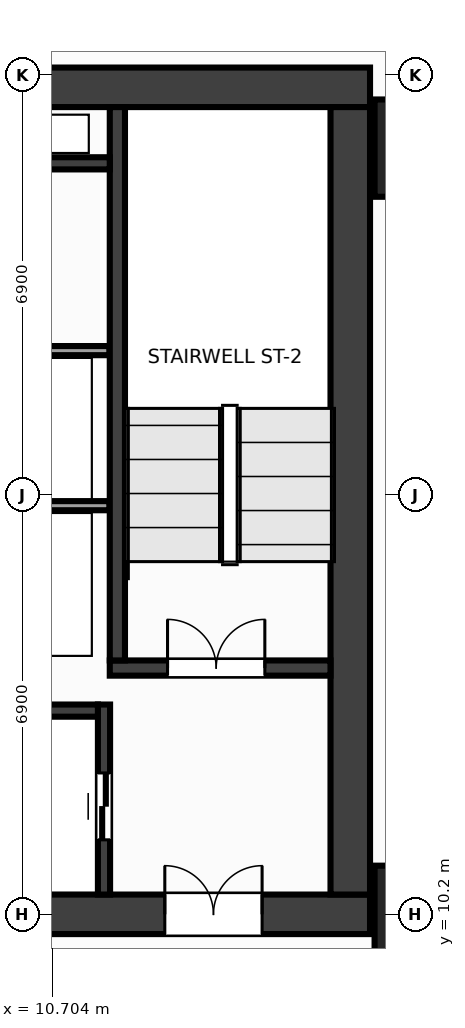
"""IFC4 building model, lengths in metres.
Left out: names, types, materials, properties, quantities, classifications, styles, units other than length and angle.
Written with IfcOpenShell. Run it as: python <this file> out.ifc"""

import sys

from ifc_helpers import new_model, si_unit, direction, frame, frame_2d, origin, origin_2d, place, context, subcontext, project, spatial, rectangle, extrude, source, transform, mapped, element, fill, save


model = new_model("IFC4")
c1 = context("Model", 3, precision=1e-05, world=origin(), true_north=direction((0.0, 1.0)))
c2 = subcontext(c1, "Body", "Model", "MODEL_VIEW")
j1 = project(units=[si_unit("LENGTHUNIT", "METRE"), si_unit("PLANEANGLEUNIT", "RADIAN")], contexts=[c1])
p1 = place(None, origin())
s1 = spatial("IfcSite", under=j1, at=p1, CompositionType="ELEMENT")
p2 = place(p1, origin())
s2 = spatial("IfcBuilding", under=s1, at=p2, CompositionType="ELEMENT")
p3 = place(p2, frame((0.0, 0.0, 120.8)))
s3 = spatial("IfcBuildingStorey", under=s2, at=p3, CompositionType="ELEMENT", Elevation=120.8)
m1 = source(origin(), c2, "Body", "SweptSolid", [
    extrude(rectangle(XDim=31.85, YDim=0.65, at=frame_2d((15.925, 0.0))), origin(), (0.0, 0.0, 1.0), 3.6),
])
p4 = place(p3, frame((-15.925, 23.8, 0.0), z_axis=(0.0, 0.0, 1.0), x_axis=(1.0, 0.0, 0.0)))
e1 = element("IfcWall", 1, at=p4, inside=s3, PredefinedType="SHEAR", context=c2, shape_type="MappedRepresentation", body=[
    mapped(m1, transform((0.0, 0.0, 0.0), x_axis=(1.0, 0.0, 0.0), y_axis=(0.0, 1.0, 0.0), z_axis=(0.0, 0.0, 1.0), scale=1.0)),
])
p5 = place(p3, frame((-15.925, 10.2, 0.0), z_axis=(0.0, 0.0, 1.0), x_axis=(1.0, 0.0, 0.0)))
e2 = element("IfcWall", 2, at=p5, inside=s3, PredefinedType="SHEAR", context=c2, shape_type="MappedRepresentation", body=[
    mapped(m1, transform((0.0, 0.0, 0.0), x_axis=(1.0, 0.0, 0.0), y_axis=(0.0, 1.0, 0.0), z_axis=(0.0, 0.0, 1.0), scale=1.0)),
])
p6 = place(p5, frame((1.775, 0.0, 0.0)))
e3 = element("IfcOpeningElement", 3, at=p6, cuts=e2, PredefinedType="OPENING", context=c2, shape_type="SweptSolid", body=[
    extrude(rectangle(XDim=1.6, YDim=2.15, at=frame_2d((0.8, 1.075))), frame((0.0, 0.337, 0.0), z_axis=(0.0, -1.0, 0.0), x_axis=(1.0, 0.0, 0.0)), (0.0, 0.0, 1.0), 0.674),
])
p7 = place(p5, frame((28.475, 0.0, 0.0)))
e4 = element("IfcOpeningElement", 4, at=p7, cuts=e2, PredefinedType="OPENING", context=c2, shape_type="SweptSolid", body=[
    extrude(rectangle(XDim=1.6, YDim=2.15, at=frame_2d((0.8, 1.075))), frame((0.0, 0.337, 0.0), z_axis=(0.0, -1.0, 0.0), x_axis=(1.0, 0.0, 0.0)), (0.0, 0.0, 1.0), 0.674),
])
p8 = place(p5, frame((15.175, 0.0, 0.0)))
e5 = element("IfcOpeningElement", 5, at=p8, cuts=e2, PredefinedType="OPENING", context=c2, shape_type="SweptSolid", body=[
    extrude(rectangle(XDim=1.5, YDim=2.2, at=frame_2d((0.75, 1.1))), frame((0.0, 0.337, 0.0), z_axis=(0.0, -1.0, 0.0), x_axis=(1.0, 0.0, 0.0)), (0.0, 0.0, 1.0), 0.674),
])
m2 = source(origin(), c2, "Body", "SweptSolid", [
    extrude(rectangle(XDim=12.95, YDim=0.65, at=frame_2d((6.475, 0.0))), origin(), (0.0, 0.0, 1.0), 3.6),
])
p9 = place(p3, frame((15.6, 10.525, 0.0), z_axis=(0.0, 0.0, 1.0), x_axis=(0.0, 1.0, 0.0)))
e6 = element("IfcWall", 6, at=p9, inside=s3, PredefinedType="SHEAR", context=c2, shape_type="MappedRepresentation", body=[
    mapped(m2, transform((0.0, 0.0, 0.0), x_axis=(1.0, 0.0, 0.0), y_axis=(0.0, 1.0, 0.0), z_axis=(0.0, 0.0, 1.0), scale=1.0)),
])
m3 = source(origin(), c2, "Body", "SweptSolid", [
    extrude(rectangle(XDim=3.63, YDim=0.25, at=frame_2d((1.815, 0.0))), origin(), (0.0, 0.0, 1.0), 3.6),
])
p10 = place(p3, frame((11.645, 14.25, 0.0), z_axis=(0.0, 0.0, 1.0), x_axis=(1.0, 0.0, 0.0)))
e7 = element("IfcWall", 7, at=p10, inside=s3, PredefinedType="SHEAR", context=c2, shape_type="MappedRepresentation", body=[
    mapped(m3, transform((0.0, 0.0, 0.0), x_axis=(1.0, 0.0, 0.0), y_axis=(0.0, 1.0, 0.0), z_axis=(0.0, 0.0, 1.0), scale=1.0)),
])
p11 = place(p10, frame((0.95, 0.0, 0.0)))
e8 = element("IfcOpeningElement", 8, at=p11, cuts=e7, PredefinedType="OPENING", context=c2, shape_type="SweptSolid", body=[
    extrude(rectangle(XDim=1.6, YDim=2.15, at=frame_2d((0.8, 1.075))), frame((0.0, 0.137, 0.0), z_axis=(0.0, -1.0, 0.0), x_axis=(1.0, 0.0, 0.0)), (0.0, 0.0, 1.0), 0.274),
])
m4 = source(origin(), c2, "Body", "SweptSolid", [
    extrude(rectangle(XDim=9.1, YDim=0.25, at=frame_2d((4.55, 0.0))), origin(), (0.0, 0.0, 1.0), 3.6),
])
p12 = place(p3, frame((11.77, 14.375, 0.0), z_axis=(0.0, 0.0, 1.0), x_axis=(0.0, 1.0, 0.0)))
e9 = element("IfcWall", 9, at=p12, inside=s3, PredefinedType="SHEAR", context=c2, shape_type="MappedRepresentation", body=[
    mapped(m4, transform((0.0, 0.0, 0.0), x_axis=(1.0, 0.0, 0.0), y_axis=(0.0, 1.0, 0.0), z_axis=(0.0, 0.0, 1.0), scale=1.0)),
])
m5 = source(origin(), c2, "Body", "SweptSolid", [
    extrude(rectangle(XDim=3.125, YDim=0.2, at=frame_2d((1.562, 0.0))), origin(), (0.0, 0.0, 1.0), 3.6),
])
p13 = place(p3, frame((11.55, 10.525, 0.0), z_axis=(0.0, 0.0, 1.0), x_axis=(0.0, 1.0, 0.0)))
e10 = element("IfcWall", 10, at=p13, inside=s3, PredefinedType="SHEAR", context=c2, shape_type="MappedRepresentation", body=[
    mapped(m5, transform((0.0, 0.0, 0.0), x_axis=(1.0, 0.0, 0.0), y_axis=(0.0, 1.0, 0.0), z_axis=(0.0, 0.0, 1.0), scale=1.0)),
])
p14 = place(p13, frame((0.9, 0.0, 0.0)))
e11 = element("IfcOpeningElement", 11, at=p14, cuts=e10, PredefinedType="OPENING", context=c2, shape_type="SweptSolid", body=[
    extrude(rectangle(XDim=1.1, YDim=2.15, at=frame_2d((0.55, 1.075))), frame((0.0, 0.112, 0.0), z_axis=(0.0, -1.0, 0.0), x_axis=(1.0, 0.0, 0.0)), (0.0, 0.0, 1.0), 0.224),
])
m6 = source(origin(), c2, "Body", "SweptSolid", [
    extrude(rectangle(XDim=2.825, YDim=0.2, at=frame_2d((1.413, 0.0))), origin(), (0.0, 0.0, 1.0), 3.6),
])
p15 = place(p3, frame((8.625, 13.55, 0.0), z_axis=(0.0, 0.0, 1.0), x_axis=(1.0, 0.0, 0.0)))
e12 = element("IfcWall", 12, at=p15, inside=s3, PredefinedType="SHEAR", context=c2, shape_type="MappedRepresentation", body=[
    mapped(m6, transform((0.0, 0.0, 0.0), x_axis=(1.0, 0.0, 0.0), y_axis=(0.0, 1.0, 0.0), z_axis=(0.0, 0.0, 1.0), scale=1.0)),
])
m7 = source(origin(), c2, "Body", "SweptSolid", [
    extrude(rectangle(XDim=3.02, YDim=0.2, at=frame_2d((1.51, 0.0))), origin(), (0.0, 0.0, 1.0), 3.6),
])
p16 = place(p3, frame((8.625, 22.55, 0.0), z_axis=(0.0, 0.0, 1.0), x_axis=(1.0, 0.0, 0.0)))
e13 = element("IfcWall", 13, at=p16, inside=s3, PredefinedType="SHEAR", context=c2, shape_type="MappedRepresentation", body=[
    mapped(m7, transform((0.0, 0.0, 0.0), x_axis=(1.0, 0.0, 0.0), y_axis=(0.0, 1.0, 0.0), z_axis=(0.0, 0.0, 1.0), scale=1.0)),
])
m8 = source(origin(), c2, "Body", "SweptSolid", [
    extrude(rectangle(XDim=1.6, YDim=1.6, at=origin_2d()), origin(), (0.0, 0.0, 1.0), 3.6),
])
for number, where, z_axis, x_axis in (
    (14, (16.8, 10.2, 0.0), (0.0, 0.0, 1.0), (1.0, 0.0, 0.0)),
    (15, (16.8, 22.8, 0.0), (0.0, 0.0, 1.0), (1.0, 0.0, 0.0)),
):
    element("IfcColumn", number, at=place(p3, frame(where, z_axis=z_axis, x_axis=x_axis)), inside=s3, PredefinedType="COLUMN", context=c2, shape_type="MappedRepresentation", body=[
        mapped(m8, transform((0.0, 0.0, 0.0), x_axis=(1.0, 0.0, 0.0), y_axis=(0.0, 1.0, 0.0), z_axis=(0.0, 0.0, 1.0), scale=1.0)),
    ])
m9 = source(origin(), c2, "Body", "SweptSolid", [
    extrude(rectangle(XDim=3.01, YDim=0.15, at=frame_2d((1.505, 0.0))), origin(), (0.0, 0.0, 1.0), 3.3),
])
for number, where, z_axis, x_axis in (
    (16, (8.63, 16.92, 0.0), (0.0, 0.0, 1.0), (1.0, 0.0, 0.0)),
    (17, (8.63, 19.47, 0.0), (0.0, 0.0, 1.0), (1.0, 0.0, 0.0)),
):
    element("IfcWall", number, at=place(p3, frame(where, z_axis=z_axis, x_axis=x_axis)), inside=s3, PredefinedType="PARTITIONING", context=c2, shape_type="MappedRepresentation", body=[
        mapped(m9, transform((0.0, 0.0, 0.0), x_axis=(1.0, 0.0, 0.0), y_axis=(0.0, 1.0, 0.0), z_axis=(0.0, 0.0, 1.0), scale=1.0)),
    ])
m10 = source(origin(), c2, "Body", "SweptSolid", [
    extrude(rectangle(XDim=1.6, YDim=2.15, at=frame_2d((0.8, 1.075))), frame((0.0, 0.025, 0.0), z_axis=(0.0, -1.0, 0.0), x_axis=(1.0, 0.0, 0.0)), (0.0, 0.0, 1.0), 0.05),
])
p17 = place(p11, origin())
e18 = element("IfcDoor", 18, at=p17, inside=s3, OperationType="DOUBLE_DOOR_SINGLE_SWING", PredefinedType="DOOR", context=c2, shape_type="MappedRepresentation", body=[
    mapped(m10, transform((0.0, 0.0, 0.0), x_axis=(1.0, 0.0, 0.0), y_axis=(0.0, 1.0, 0.0), z_axis=(0.0, 0.0, 1.0), scale=1.0)),
])
fill(e8, e18)
p18 = place(p7, origin())
e19 = element("IfcDoor", 19, at=p18, inside=s3, OperationType="DOUBLE_DOOR_SINGLE_SWING", PredefinedType="DOOR", context=c2, shape_type="MappedRepresentation", body=[
    mapped(m10, transform((0.0, 0.0, 0.0), x_axis=(1.0, 0.0, 0.0), y_axis=(0.0, 1.0, 0.0), z_axis=(0.0, 0.0, 1.0), scale=1.0)),
])
fill(e4, e19)
m11 = source(origin(), c2, "Body", "SweptSolid", [
    extrude(rectangle(XDim=1.1, YDim=2.15, at=frame_2d((0.55, 1.075))), frame((0.0, 0.025, 0.0), z_axis=(0.0, -1.0, 0.0), x_axis=(1.0, 0.0, 0.0)), (0.0, 0.0, 1.0), 0.05),
])
p19 = place(p14, origin())
e20 = element("IfcDoor", 20, at=p19, inside=s3, OperationType="DOUBLE_DOOR_SLIDING", PredefinedType="DOOR", context=c2, shape_type="MappedRepresentation", body=[
    mapped(m11, transform((0.0, 0.0, 0.0), x_axis=(1.0, 0.0, 0.0), y_axis=(0.0, 1.0, 0.0), z_axis=(0.0, 0.0, 1.0), scale=1.0)),
])
fill(e11, e20)
save(model, sys.argv[1])
